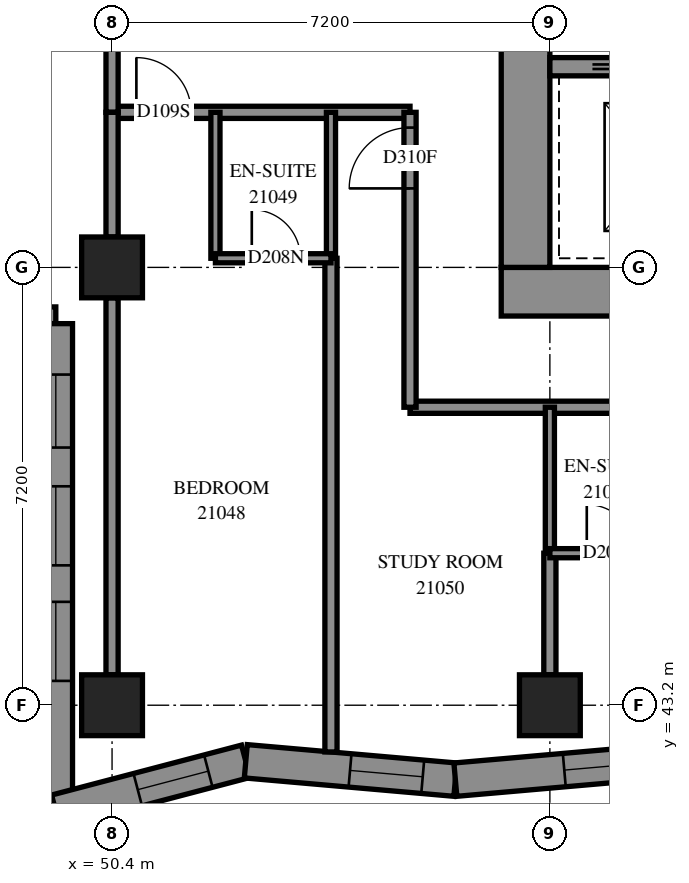
"""IFC4 building model, lengths in metres.
Left out: names, types, materials, properties, quantities, classifications, styles, units other than length and angle.
Written with IfcOpenShell. Run it as: python <this file> out.ifc"""

import sys

from ifc_helpers import new_model, si_unit, direction, frame, frame_2d, origin, origin_2d, place, context, subcontext, project, spatial, polyline, rectangle, outline, extrude, element, fill, save


model = new_model("IFC4")
c1 = context("Model", 3, precision=1e-05, world=origin(), true_north=direction((0.0, 1.0)))
c2 = subcontext(c1, "Body", "Model", "MODEL_VIEW")
j1 = project(units=[si_unit("LENGTHUNIT", "METRE"), si_unit("PLANEANGLEUNIT", "RADIAN")], contexts=[c1])
p1 = place(None, origin())
s1 = spatial("IfcSite", under=j1, at=p1, CompositionType="ELEMENT")
p2 = place(p1, origin())
s2 = spatial("IfcBuilding", under=s1, at=p2, CompositionType="ELEMENT")
p3 = place(p2, frame((0.0, 0.0, 81.2)))
s3 = spatial("IfcBuildingStorey", under=s2, at=p3, CompositionType="ELEMENT", Elevation=81.2)
for number, where, z_axis, x_axis in (
    (1, (50.4, 43.2, 0.0), (0.0, 0.0, 1.0), (1.0, 0.0, 0.0)),
    (2, (50.4, 50.4, 0.0), (0.0, 0.0, 1.0), (1.0, 0.0, 0.0)),
    (3, (57.6, 43.2, 0.0), (0.0, 0.0, 1.0), (1.0, 0.0, 0.0)),
):
    element("IfcColumn", number, at=place(p3, frame(where, z_axis=z_axis, x_axis=x_axis)), inside=s3, PredefinedType="COLUMN", context=c2, shape_type="SweptSolid", body=[
        extrude(rectangle(XDim=1.0, YDim=1.0, at=origin_2d()), origin(), (0.0, 0.0, 1.0), 3.1),
    ])
p4 = place(p3, frame((56.8, 50.0, -0.3), z_axis=(0.0, 0.0, 1.0), x_axis=(1.0, 0.0, 0.0)))
e4 = element("IfcWall", 4, at=p4, inside=s3, PredefinedType="SHEAR", context=c2, shape_type="SweptSolid", body=[
    extrude(rectangle(XDim=16.0, YDim=0.8, at=frame_2d((8.0, 0.0))), origin(), (0.0, 0.0, 1.0), 2.7),
])
p5 = place(p3, frame((57.2, 50.4, -0.3), z_axis=(0.0, 0.0, 1.0), x_axis=(0.0, 1.0, 0.0)))
e5 = element("IfcWall", 5, at=p5, inside=s3, PredefinedType="SHEAR", context=c2, shape_type="SweptSolid", body=[
    extrude(rectangle(XDim=14.4, YDim=0.8, at=frame_2d((7.2, 0.0))), origin(), (0.0, 0.0, 1.0), 2.7),
])
p6 = place(p5, frame((4.55, 0.0, 0.3)))
e6 = element("IfcOpeningElement", 6, at=p6, cuts=e5, PredefinedType="OPENING", context=c2, shape_type="SweptSolid", body=[
    extrude(rectangle(XDim=1.1, YDim=2.1, at=frame_2d((0.55, 1.05))), frame((0.0, 0.41, 0.0), z_axis=(0.0, -1.0, 0.0), x_axis=(1.0, 0.0, 0.0)), (0.0, 0.0, 1.0), 0.82),
])
p7 = place(p5, frame((11.35, 0.0, 0.3)))
e7 = element("IfcOpeningElement", 7, at=p7, cuts=e5, PredefinedType="OPENING", context=c2, shape_type="SweptSolid", body=[
    extrude(rectangle(XDim=1.1, YDim=2.1, at=frame_2d((0.55, 1.05))), frame((0.0, 0.41, 0.0), z_axis=(0.0, -1.0, 0.0), x_axis=(1.0, 0.0, 0.0)), (0.0, 0.0, 1.0), 0.82),
])
p8 = place(p3, frame((57.6, 53.7, 0.0), z_axis=(0.0, 0.0, 1.0), x_axis=(1.0, 0.0, 0.0)))
e8 = element("IfcWall", 8, at=p8, inside=s3, PredefinedType="SOLIDWALL", context=c2, shape_type="SweptSolid", body=[
    extrude(rectangle(XDim=14.4, YDim=0.3, at=frame_2d((7.2, 0.0))), origin(), (0.0, 0.0, 1.0), 3.1),
])
p9 = place(p8, frame((1.25, 0.0, 0.0)))
e9 = element("IfcOpeningElement", 9, at=p9, cuts=e8, PredefinedType="OPENING", context=c2, shape_type="SweptSolid", body=[
    extrude(rectangle(XDim=1.1, YDim=2.1, at=frame_2d((0.55, 1.05))), frame((0.0, 0.16, 0.0), z_axis=(0.0, -1.0, 0.0), x_axis=(1.0, 0.0, 0.0)), (0.0, 0.0, 1.0), 0.32),
])
p10 = place(p8, frame((4.85, 0.0, 0.0)))
e10 = element("IfcOpeningElement", 10, at=p10, cuts=e8, PredefinedType="OPENING", context=c2, shape_type="SweptSolid", body=[
    extrude(rectangle(XDim=1.1, YDim=2.1, at=frame_2d((0.55, 1.05))), frame((0.0, 0.16, 0.0), z_axis=(0.0, -1.0, 0.0), x_axis=(1.0, 0.0, 0.0)), (0.0, 0.0, 1.0), 0.32),
])
p11 = place(p8, frame((8.45, 0.0, 0.0)))
e11 = element("IfcOpeningElement", 11, at=p11, cuts=e8, PredefinedType="OPENING", context=c2, shape_type="SweptSolid", body=[
    extrude(rectangle(XDim=1.1, YDim=2.1, at=frame_2d((0.55, 1.05))), frame((0.0, 0.16, 0.0), z_axis=(0.0, -1.0, 0.0), x_axis=(1.0, 0.0, 0.0)), (0.0, 0.0, 1.0), 0.32),
])
p12 = place(p8, frame((12.05, 0.0, 0.0)))
e12 = element("IfcOpeningElement", 12, at=p12, cuts=e8, PredefinedType="OPENING", context=c2, shape_type="SweptSolid", body=[
    extrude(rectangle(XDim=1.1, YDim=2.1, at=frame_2d((0.55, 1.05))), frame((0.0, 0.16, 0.0), z_axis=(0.0, -1.0, 0.0), x_axis=(1.0, 0.0, 0.0)), (0.0, 0.0, 1.0), 0.32),
])
p13 = place(p3, frame((42.275, 49.475, 0.0), z_axis=(0.0, 0.0, 1.0), x_axis=(1.0, 0.0, 0.0)))
e13 = element("IfcWall", 13, at=p13, inside=s3, PredefinedType="SOLIDWALL", context=c2, shape_type="SweptSolid", body=[
    extrude(outline(polyline([(-0.275, -0.275), (6.925, -0.275), (7.475, 0.275), (0.275, 0.275), (-0.275, -0.275)])), origin(), (0.0, 0.0, 1.0), 3.1),
])
p14 = place(p13, frame((1.325, 0.0, 0.5)))
e14 = element("IfcOpeningElement", 14, at=p14, cuts=e13, PredefinedType="OPENING", context=c2, shape_type="SweptSolid", body=[
    extrude(rectangle(XDim=1.3, YDim=2.45, at=frame_2d((0.65, 1.225))), frame((0.0, 0.285, 0.0), z_axis=(0.0, -1.0, 0.0), x_axis=(1.0, 0.0, 0.0)), (0.0, 0.0, 1.0), 0.57),
])
p15 = place(p13, frame((2.825, 0.0, 0.5)))
e15 = element("IfcOpeningElement", 15, at=p15, cuts=e13, PredefinedType="OPENING", context=c2, shape_type="SweptSolid", body=[
    extrude(rectangle(XDim=1.3, YDim=2.45, at=frame_2d((0.65, 1.225))), frame((0.0, 0.285, 0.0), z_axis=(0.0, -1.0, 0.0), x_axis=(1.0, 0.0, 0.0)), (0.0, 0.0, 1.0), 0.57),
])
p16 = place(p13, frame((5.162, 0.0, 0.5)))
e16 = element("IfcOpeningElement", 16, at=p16, cuts=e13, PredefinedType="OPENING", context=c2, shape_type="SweptSolid", body=[
    extrude(rectangle(XDim=1.2, YDim=2.45, at=frame_2d((0.6, 1.225))), frame((0.0, 0.285, 0.0), z_axis=(0.0, -1.0, 0.0), x_axis=(1.0, 0.0, 0.0)), (0.0, 0.0, 1.0), 0.57),
])
p17 = place(p3, frame((49.475, 49.475, 0.0), z_axis=(0.0, 0.0, 1.0), x_axis=(0.0, -1.0, 0.0)))
e17 = element("IfcWall", 17, at=p17, inside=s3, PredefinedType="SOLIDWALL", context=c2, shape_type="SweptSolid", body=[
    extrude(outline(polyline([(0.275, -0.275), (8.375, -0.275), (7.662, 0.275), (-0.275, 0.275), (0.275, -0.275)])), origin(), (0.0, 0.0, 1.0), 3.1),
])
p18 = place(p17, frame((2.675, 0.0, 0.5)))
e18 = element("IfcOpeningElement", 18, at=p18, cuts=e17, PredefinedType="OPENING", context=c2, shape_type="SweptSolid", body=[
    extrude(rectangle(XDim=1.3, YDim=2.45, at=frame_2d((0.65, 1.225))), frame((0.0, 0.285, 0.0), z_axis=(0.0, -1.0, 0.0), x_axis=(1.0, 0.0, 0.0)), (0.0, 0.0, 1.0), 0.57),
])
p19 = place(p17, frame((4.575, 0.0, 0.5)))
e19 = element("IfcOpeningElement", 19, at=p19, cuts=e17, PredefinedType="OPENING", context=c2, shape_type="SweptSolid", body=[
    extrude(rectangle(XDim=1.3, YDim=2.45, at=frame_2d((0.65, 1.225))), frame((0.0, 0.285, 0.0), z_axis=(0.0, -1.0, 0.0), x_axis=(1.0, 0.0, 0.0)), (0.0, 0.0, 1.0), 0.57),
])
p20 = place(p17, frame((0.838, 0.0, 0.5)))
e20 = element("IfcOpeningElement", 20, at=p20, cuts=e17, PredefinedType="OPENING", context=c2, shape_type="SweptSolid", body=[
    extrude(rectangle(XDim=1.2, YDim=2.45, at=frame_2d((0.6, 1.225))), frame((0.0, 0.285, 0.0), z_axis=(0.0, -1.0, 0.0), x_axis=(1.0, 0.0, 0.0)), (0.0, 0.0, 1.0), 0.57),
])
p21 = place(p3, frame((49.475, 41.457, 0.0), z_axis=(0.0, 0.0, 1.0), x_axis=(0.9671322544, 0.2542738729, 0.0)))
e21 = element("IfcWall", 21, at=p21, inside=s3, PredefinedType="SOLIDWALL", context=c2, shape_type="SweptSolid", body=[
    extrude(outline(polyline([(-0.357, -0.275), (3.183, -0.275), (3.278, 0.275), (0.357, 0.275), (-0.357, -0.275)])), origin(), (0.0, 0.0, 1.0), 3.1),
])
p22 = place(p21, frame((1.393, 0.0, 0.5)))
e22 = element("IfcOpeningElement", 22, at=p22, cuts=e21, PredefinedType="OPENING", context=c2, shape_type="SweptSolid", body=[
    extrude(rectangle(XDim=1.2, YDim=2.45, at=frame_2d((0.6, 1.225))), frame((0.0, 0.285, 0.0), z_axis=(0.0, -1.0, 0.0), x_axis=(1.0, 0.0, 0.0)), (0.0, 0.0, 1.0), 0.57),
])
p23 = place(p3, frame((52.599, 42.278, 0.0), z_axis=(0.0, 0.0, 1.0), x_axis=(0.9961831061, -0.0872881385, 0.0)))
e23 = element("IfcWall", 23, at=p23, inside=s3, PredefinedType="SOLIDWALL", context=c2, shape_type="SweptSolid", body=[
    extrude(outline(polyline([(0.048, -0.275), (3.484, -0.275), (3.436, 0.275), (-0.048, 0.275), (0.048, -0.275)])), origin(), (0.0, 0.0, 1.0), 3.1),
])
p24 = place(p23, frame((1.721, 0.0, 0.5)))
e24 = element("IfcOpeningElement", 24, at=p24, cuts=e23, PredefinedType="OPENING", context=c2, shape_type="SweptSolid", body=[
    extrude(rectangle(XDim=1.2, YDim=2.45, at=frame_2d((0.6, 1.225))), frame((0.0, 0.285, 0.0), z_axis=(0.0, -1.0, 0.0), x_axis=(1.0, 0.0, 0.0)), (0.0, 0.0, 1.0), 0.57),
])
p25 = place(p3, frame((56.046, 41.976, 0.0), z_axis=(0.0, 0.0, 1.0), x_axis=(0.996181166, 0.0873102778, 0.0)))
e25 = element("IfcWall", 25, at=p25, inside=s3, PredefinedType="SOLIDWALL", context=c2, shape_type="SweptSolid", body=[
    extrude(outline(polyline([(-0.024, -0.275), (3.412, -0.275), (3.46, 0.275), (0.024, 0.275), (-0.024, -0.275)])), origin(), (0.0, 0.0, 1.0), 3.1),
])
p26 = place(p25, frame((1.798, 0.0, 0.5)))
e26 = element("IfcOpeningElement", 26, at=p26, cuts=e25, PredefinedType="OPENING", context=c2, shape_type="SweptSolid", body=[
    extrude(rectangle(XDim=1.2, YDim=2.45, at=frame_2d((0.6, 1.225))), frame((0.0, 0.285, 0.0), z_axis=(0.0, -1.0, 0.0), x_axis=(1.0, 0.0, 0.0)), (0.0, 0.0, 1.0), 0.57),
])
p27 = place(p3, frame((55.3, 48.1, 0.0), z_axis=(0.0, 0.0, 1.0), x_axis=(1.0, 0.0, 0.0)))
e27 = element("IfcWall", 27, at=p27, inside=s3, PredefinedType="PARTITIONING", context=c2, shape_type="SweptSolid", body=[
    extrude(rectangle(XDim=19.092, YDim=0.2, at=frame_2d((9.546, 0.0))), origin(), (0.0, 0.0, 1.0), 3.1),
])
p28 = place(p27, frame((6.199, 0.0, 0.0)))
e28 = element("IfcOpeningElement", 28, at=p28, cuts=e27, PredefinedType="OPENING", context=c2, shape_type="SweptSolid", body=[
    extrude(rectangle(XDim=0.9, YDim=2.1, at=frame_2d((0.45, 1.05))), frame((0.0, 0.11, 0.0), z_axis=(0.0, -1.0, 0.0), x_axis=(1.0, 0.0, 0.0)), (0.0, 0.0, 1.0), 0.22),
])
p29 = place(p27, frame((13.363, 0.0, 0.0)))
e29 = element("IfcOpeningElement", 29, at=p29, cuts=e27, PredefinedType="OPENING", context=c2, shape_type="SweptSolid", body=[
    extrude(rectangle(XDim=1.0, YDim=2.1, at=frame_2d((0.5, 1.05))), frame((0.0, 0.11, 0.0), z_axis=(0.0, -1.0, 0.0), x_axis=(1.0, 0.0, 0.0)), (0.0, 0.0, 1.0), 0.22),
])
p30 = place(p3, frame((54.0, 42.431, 0.0), z_axis=(0.0, 0.0, 1.0), x_axis=(0.0, 1.0, 0.0)))
e30 = element("IfcWall", 30, at=p30, inside=s3, PredefinedType="PARTITIONING", context=c2, shape_type="SweptSolid", body=[
    extrude(rectangle(XDim=8.119, YDim=0.2, at=frame_2d((4.059, 0.0))), origin(), (0.0, 0.0, 1.0), 3.1),
])
p31 = place(p3, frame((50.4, 43.7, 0.0), z_axis=(0.0, 0.0, 1.0), x_axis=(0.0, 1.0, 0.0)))
e31 = element("IfcWall", 31, at=p31, inside=s3, PredefinedType="PARTITIONING", context=c2, shape_type="SweptSolid", body=[
    extrude(rectangle(XDim=6.2, YDim=0.2, at=frame_2d((3.1, 0.0))), origin(), (0.0, 0.0, 1.0), 2.6),
])
p32 = place(p3, frame((50.4, 52.95, 0.0), z_axis=(0.0, 0.0, 1.0), x_axis=(1.0, 0.0, 0.0)))
e32 = element("IfcWall", 32, at=p32, inside=s3, PredefinedType="PARTITIONING", context=c2, shape_type="SweptSolid", body=[
    extrude(rectangle(XDim=4.9, YDim=0.2, at=frame_2d((2.45, 0.0))), origin(), (0.0, 0.0, 1.0), 3.1),
])
p33 = place(p32, frame((0.4, 0.0, 0.0)))
e33 = element("IfcOpeningElement", 33, at=p33, cuts=e32, PredefinedType="OPENING", context=c2, shape_type="SweptSolid", body=[
    extrude(rectangle(XDim=0.9, YDim=2.1, at=frame_2d((0.45, 1.05))), frame((0.0, 0.11, 0.0), z_axis=(0.0, -1.0, 0.0), x_axis=(1.0, 0.0, 0.0)), (0.0, 0.0, 1.0), 0.22),
])
p34 = place(p3, frame((55.3, 48.1, 0.0), z_axis=(0.0, 0.0, 1.0), x_axis=(0.0, 1.0, 0.0)))
e34 = element("IfcWall", 34, at=p34, inside=s3, PredefinedType="PARTITIONING", context=c2, shape_type="SweptSolid", body=[
    extrude(rectangle(XDim=4.85, YDim=0.2, at=frame_2d((2.425, 0.0))), origin(), (0.0, 0.0, 1.0), 3.1),
])
p35 = place(p34, frame((3.599, 0.0, 0.0)))
e35 = element("IfcOpeningElement", 35, at=p35, cuts=e34, PredefinedType="OPENING", context=c2, shape_type="SweptSolid", body=[
    extrude(rectangle(XDim=1.0, YDim=2.1, at=frame_2d((0.5, 1.05))), frame((0.0, 0.11, 0.0), z_axis=(0.0, -1.0, 0.0), x_axis=(1.0, 0.0, 0.0)), (0.0, 0.0, 1.0), 0.22),
])
for number, where, z_axis, x_axis in (
    (36, (52.1, 50.55, 0.0), (0.0, 0.0, 1.0), (0.0, 1.0, 0.0)),
    (37, (54.0, 50.55, 0.0), (0.0, 0.0, 1.0), (0.0, 1.0, 0.0)),
    (38, (57.6, 45.7, 0.0), (0.0, 0.0, 1.0), (0.0, 1.0, 0.0)),
):
    element("IfcWall", number, at=place(p3, frame(where, z_axis=z_axis, x_axis=x_axis)), inside=s3, PredefinedType="PARTITIONING", context=c2, shape_type="SweptSolid", body=[
        extrude(rectangle(XDim=2.4, YDim=0.15, at=frame_2d((1.2, 0.0))), origin(), (0.0, 0.0, 1.0), 3.1),
    ])
p36 = place(p3, frame((50.4, 52.95, 0.0), z_axis=(0.0, 0.0, 1.0), x_axis=(0.0, 1.0, 0.0)))
e39 = element("IfcWall", 39, at=p36, inside=s3, PredefinedType="PARTITIONING", context=c2, shape_type="SweptSolid", body=[
    extrude(rectangle(XDim=2.1, YDim=0.2, at=frame_2d((1.05, 0.0))), origin(), (0.0, 0.0, 1.0), 3.1),
])
p37 = place(p3, frame((50.4, 50.9, 0.0), z_axis=(0.0, 0.0, 1.0), x_axis=(0.0, 1.0, 0.0)))
e40 = element("IfcWall", 40, at=p37, inside=s3, PredefinedType="PARTITIONING", context=c2, shape_type="SweptSolid", body=[
    extrude(rectangle(XDim=2.05, YDim=0.2, at=frame_2d((1.025, 0.0))), origin(), (0.0, 0.0, 1.0), 3.1),
])
p38 = place(p3, frame((57.6, 43.7, 0.0), z_axis=(0.0, 0.0, 1.0), x_axis=(0.0, 1.0, 0.0)))
e41 = element("IfcWall", 41, at=p38, inside=s3, PredefinedType="PARTITIONING", context=c2, shape_type="SweptSolid", body=[
    extrude(rectangle(XDim=2.0, YDim=0.2, at=frame_2d((1.0, 0.0))), origin(), (0.0, 0.0, 1.0), 3.1),
])
p39 = place(p3, frame((52.1, 50.55, 0.0), z_axis=(0.0, 0.0, 1.0), x_axis=(1.0, 0.0, 0.0)))
e42 = element("IfcWall", 42, at=p39, inside=s3, PredefinedType="PARTITIONING", context=c2, shape_type="SweptSolid", body=[
    extrude(rectangle(XDim=1.9, YDim=0.15, at=frame_2d((0.95, 0.0))), origin(), (0.0, 0.0, 1.0), 3.1),
])
p40 = place(p39, frame((0.598, 0.0, 0.0)))
e43 = element("IfcOpeningElement", 43, at=p40, cuts=e42, PredefinedType="OPENING", context=c2, shape_type="SweptSolid", body=[
    extrude(rectangle(XDim=0.8, YDim=2.1, at=frame_2d((0.4, 1.05))), frame((0.0, 0.085, 0.0), z_axis=(0.0, -1.0, 0.0), x_axis=(1.0, 0.0, 0.0)), (0.0, 0.0, 1.0), 0.17),
])
p41 = place(p3, frame((57.6, 45.7, 0.0), z_axis=(0.0, 0.0, 1.0), x_axis=(1.0, 0.0, 0.0)))
e44 = element("IfcWall", 44, at=p41, inside=s3, PredefinedType="PARTITIONING", context=c2, shape_type="SweptSolid", body=[
    extrude(rectangle(XDim=1.9, YDim=0.15, at=frame_2d((0.95, 0.0))), origin(), (0.0, 0.0, 1.0), 3.1),
])
p42 = place(p41, frame((0.607, 0.0, 0.0)))
e45 = element("IfcOpeningElement", 45, at=p42, cuts=e44, PredefinedType="OPENING", context=c2, shape_type="SweptSolid", body=[
    extrude(rectangle(XDim=0.8, YDim=2.1, at=frame_2d((0.4, 1.05))), frame((0.0, 0.085, 0.0), z_axis=(0.0, -1.0, 0.0), x_axis=(1.0, 0.0, 0.0)), (0.0, 0.0, 1.0), 0.17),
])
p43 = place(p18, origin())
e46 = element("IfcWindow", 46, at=p43, inside=s3, PartitioningType="SINGLE_PANEL", PredefinedType="WINDOW", context=c2, shape_type="SweptSolid", body=[
    extrude(rectangle(XDim=1.3, YDim=2.45, at=frame_2d((0.65, 1.225))), frame((0.0, 0.155, 0.0), z_axis=(0.0, -1.0, 0.0), x_axis=(1.0, 0.0, 0.0)), (0.0, 0.0, 1.0), 0.06),
])
fill(e18, e46)
p44 = place(p19, origin())
e47 = element("IfcWindow", 47, at=p44, inside=s3, PartitioningType="SINGLE_PANEL", PredefinedType="WINDOW", context=c2, shape_type="SweptSolid", body=[
    extrude(rectangle(XDim=1.3, YDim=2.45, at=frame_2d((0.65, 1.225))), frame((0.0, 0.155, 0.0), z_axis=(0.0, -1.0, 0.0), x_axis=(1.0, 0.0, 0.0)), (0.0, 0.0, 1.0), 0.06),
])
fill(e19, e47)
p45 = place(p20, origin())
e48 = element("IfcWindow", 48, at=p45, inside=s3, PartitioningType="SINGLE_PANEL", PredefinedType="WINDOW", context=c2, shape_type="SweptSolid", body=[
    extrude(rectangle(XDim=1.2, YDim=2.45, at=frame_2d((0.6, 1.225))), frame((0.0, 0.155, 0.0), z_axis=(0.0, -1.0, 0.0), x_axis=(1.0, 0.0, 0.0)), (0.0, 0.0, 1.0), 0.06),
])
fill(e20, e48)
p46 = place(p22, origin())
e49 = element("IfcWindow", 49, at=p46, inside=s3, PartitioningType="SINGLE_PANEL", PredefinedType="WINDOW", context=c2, shape_type="SweptSolid", body=[
    extrude(rectangle(XDim=1.2, YDim=2.45, at=frame_2d((0.6, 1.225))), frame((0.0, 0.155, 0.0), z_axis=(0.0, -1.0, 0.0), x_axis=(1.0, 0.0, 0.0)), (0.0, 0.0, 1.0), 0.06),
])
fill(e22, e49)
p47 = place(p24, origin())
e50 = element("IfcWindow", 50, at=p47, inside=s3, PartitioningType="SINGLE_PANEL", PredefinedType="WINDOW", context=c2, shape_type="SweptSolid", body=[
    extrude(rectangle(XDim=1.2, YDim=2.45, at=frame_2d((0.6, 1.225))), frame((0.0, 0.155, 0.0), z_axis=(0.0, -1.0, 0.0), x_axis=(1.0, 0.0, 0.0)), (0.0, 0.0, 1.0), 0.06),
])
fill(e24, e50)
p48 = place(p26, origin())
e51 = element("IfcWindow", 51, at=p48, inside=s3, PartitioningType="SINGLE_PANEL", PredefinedType="WINDOW", context=c2, shape_type="SweptSolid", body=[
    extrude(rectangle(XDim=1.2, YDim=2.45, at=frame_2d((0.6, 1.225))), frame((0.0, 0.155, 0.0), z_axis=(0.0, -1.0, 0.0), x_axis=(1.0, 0.0, 0.0)), (0.0, 0.0, 1.0), 0.06),
])
fill(e26, e51)
p49 = place(p33, origin())
e52 = element("IfcDoor", 52, at=p49, inside=s3, OperationType="SINGLE_SWING_LEFT", PredefinedType="DOOR", context=c2, shape_type="SweptSolid", body=[
    extrude(rectangle(XDim=0.9, YDim=2.1, at=frame_2d((0.45, 1.05))), frame((0.0, 0.025, 0.0), z_axis=(0.0, -1.0, 0.0), x_axis=(1.0, 0.0, 0.0)), (0.0, 0.0, 1.0), 0.05),
])
fill(e33, e52)
p50 = place(p40, origin())
e53 = element("IfcDoor", 53, at=p50, inside=s3, OperationType="SINGLE_SWING_RIGHT", PredefinedType="DOOR", context=c2, shape_type="SweptSolid", body=[
    extrude(rectangle(XDim=0.8, YDim=2.1, at=frame_2d((0.4, 1.05))), frame((0.0, 0.025, 0.0), z_axis=(0.0, -1.0, 0.0), x_axis=(1.0, 0.0, 0.0)), (0.0, 0.0, 1.0), 0.05),
])
fill(e43, e53)
p51 = place(p35, origin())
e54 = element("IfcDoor", 54, at=p51, inside=s3, OperationType="SINGLE_SWING_RIGHT", PredefinedType="DOOR", context=c2, shape_type="SweptSolid", body=[
    extrude(rectangle(XDim=1.0, YDim=2.1, at=frame_2d((0.5, 1.05))), frame((0.0, 0.025, 0.0), z_axis=(0.0, -1.0, 0.0), x_axis=(1.0, 0.0, 0.0)), (0.0, 0.0, 1.0), 0.05),
])
fill(e35, e54)
p52 = place(p42, origin())
e55 = element("IfcDoor", 55, at=p52, inside=s3, OperationType="SINGLE_SWING_RIGHT", PredefinedType="DOOR", context=c2, shape_type="SweptSolid", body=[
    extrude(rectangle(XDim=0.8, YDim=2.1, at=frame_2d((0.4, 1.05))), frame((0.0, 0.025, 0.0), z_axis=(0.0, -1.0, 0.0), x_axis=(1.0, 0.0, 0.0)), (0.0, 0.0, 1.0), 0.05),
])
fill(e45, e55)
save(model, sys.argv[1])
